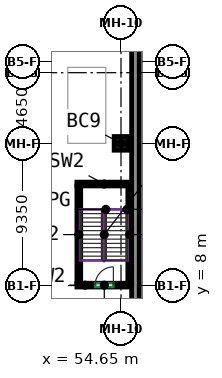
"""IFC4 building model, lengths in metres.
Left out: names, types, materials, properties, quantities, classifications, styles, units other than length and angle.
Written with IfcOpenShell. Run it as: python <this file> out.ifc"""

import sys

from ifc_helpers import new_model, si_unit, direction, frame, frame_2d, origin, origin_2d, place, context, subcontext, project, spatial, rectangle, extrude, source, transform, mapped, element, fill, save


model = new_model("IFC4")
c1 = context("Model", 3, precision=1e-05, world=origin(), true_north=direction((0.0, 1.0)))
c2 = subcontext(c1, "Body", "Model", "MODEL_VIEW")
j1 = project(units=[si_unit("LENGTHUNIT", "METRE"), si_unit("PLANEANGLEUNIT", "RADIAN")], contexts=[c1])
p1 = place(None, origin())
s1 = spatial("IfcSite", under=j1, at=p1, CompositionType="ELEMENT")
p2 = place(p1, origin())
s2 = spatial("IfcBuilding", under=s1, at=p2, CompositionType="ELEMENT")
p3 = place(p2, frame((0.0, 0.0, -4.5)))
s3 = spatial("IfcBuildingStorey", under=s2, at=p3, CompositionType="ELEMENT", Elevation=-4.5)
m1 = source(origin(), c2, "Body", "SweptSolid", [
    extrude(rectangle(XDim=0.9, YDim=0.9, at=origin_2d()), origin(), (0.0, 0.0, 1.0), 4.5),
])
p4 = place(p3, frame((54.65, 17.35, 0.0), z_axis=(0.0, 0.0, 1.0), x_axis=(1.0, 0.0, 0.0)))
e1 = element("IfcColumn", 1, at=p4, inside=s3, PredefinedType="COLUMN", context=c2, shape_type="MappedRepresentation", body=[
    mapped(m1, transform((0.0, 0.0, 0.0))),
])
m2 = source(origin(), c2, "Body", "SweptSolid", [
    extrude(rectangle(XDim=100.0, YDim=0.5, at=frame_2d((50.0, 0.0))), origin(), (0.0, 0.0, 1.0), 4.5),
])
p5 = place(p3, frame((55.6, -43.35, 0.0), z_axis=(0.0, 0.0, 1.0), x_axis=(0.0, 1.0, 0.0)))
e2 = element("IfcWall", 2, at=p5, inside=s3, PredefinedType="SOLIDWALL", context=c2, shape_type="MappedRepresentation", body=[
    mapped(m2, transform((0.0, 0.0, 0.0))),
])
m3 = source(origin(), c2, "Body", "SweptSolid", [
    extrude(rectangle(XDim=3.6, YDim=0.25, at=frame_2d((1.8, 0.0))), origin(), (0.0, 0.0, 1.0), 4.09),
])
p6 = place(p3, frame((51.75, 8.025, 0.0), z_axis=(0.0, 0.0, 1.0), x_axis=(1.0, 0.0, 0.0)))
e3 = element("IfcWall", 3, at=p6, inside=s3, PredefinedType="SHEAR", context=c2, shape_type="MappedRepresentation", body=[
    mapped(m3, transform((0.0, 0.0, 0.0))),
])
p7 = place(p6, frame((1.2, 0.0, 0.0)))
e4 = element("IfcOpeningElement", 4, at=p7, cuts=e3, PredefinedType="OPENING", context=c2, shape_type="SweptSolid", body=[
    extrude(rectangle(XDim=1.2, YDim=2.1, at=frame_2d((0.6, 1.05))), frame((0.0, 0.135, 0.0), z_axis=(0.0, -1.0, 0.0), x_axis=(1.0, 0.0, 0.0)), (0.0, 0.0, 1.0), 0.27),
])
p8 = place(p3, frame((51.75, 14.675, 0.0), z_axis=(0.0, 0.0, 1.0), x_axis=(1.0, 0.0, 0.0)))
e5 = element("IfcWall", 5, at=p8, inside=s3, PredefinedType="SHEAR", context=c2, shape_type="MappedRepresentation", body=[
    mapped(m3, transform((0.0, 0.0, 0.0))),
])
m4 = source(origin(), c2, "Body", "SweptSolid", [
    extrude(rectangle(XDim=6.4, YDim=0.25, at=frame_2d((3.2, 0.0))), origin(), (0.0, 0.0, 1.0), 4.09),
])
for number, where, z_axis, x_axis in (
    (6, (51.875, 8.15, 0.0), (0.0, 0.0, 1.0), (0.0, 1.0, 0.0)),
    (7, (55.225, 8.15, 0.0), (0.0, 0.0, 1.0), (0.0, 1.0, 0.0)),
):
    element("IfcWall", number, at=place(p3, frame(where, z_axis=z_axis, x_axis=x_axis)), inside=s3, PredefinedType="SHEAR", context=c2, shape_type="MappedRepresentation", body=[
        mapped(m4, transform((0.0, 0.0, 0.0))),
    ])
p9 = place(p7, origin())
e8 = element("IfcDoor", 8, at=p9, inside=s3, OperationType="SINGLE_SWING_RIGHT", PredefinedType="DOOR", context=c2, shape_type="SweptSolid", body=[
    extrude(rectangle(XDim=1.2, YDim=2.1, at=frame_2d((0.6, 1.05))), frame((0.0, 0.025, 0.0), z_axis=(0.0, -1.0, 0.0), x_axis=(1.0, 0.0, 0.0)), (0.0, 0.0, 1.0), 0.05),
])
fill(e4, e8)
save(model, sys.argv[1])
